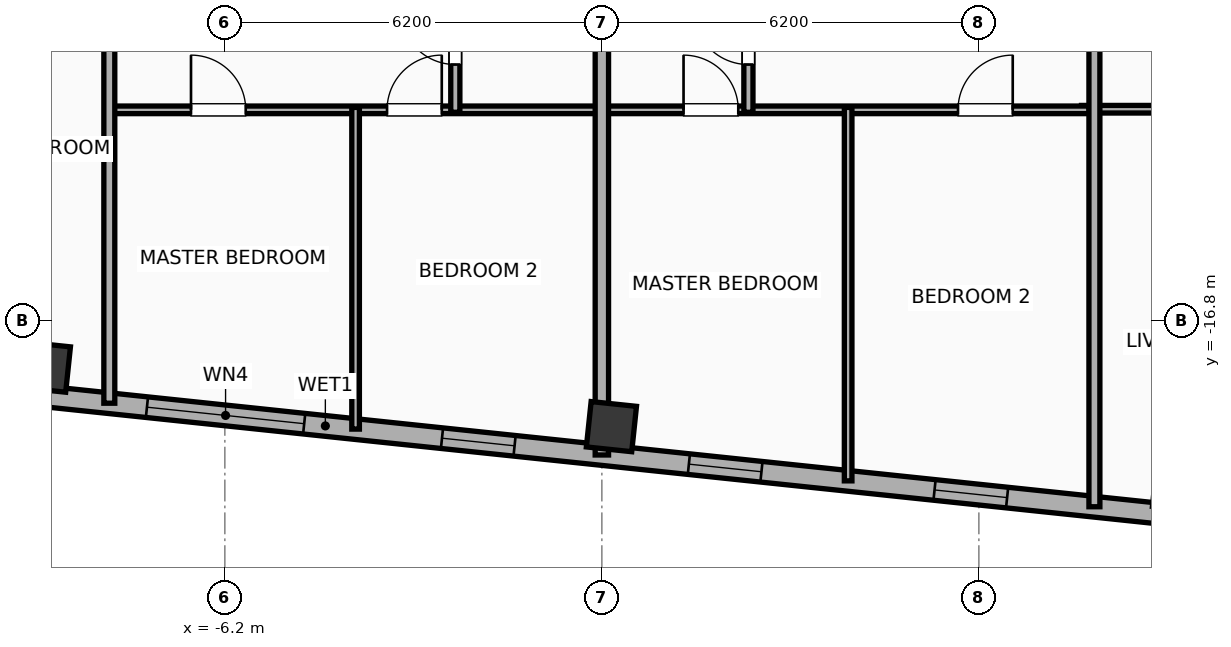
"""IFC4 building model, lengths in metres.
Left out: names, types, materials, properties, quantities, classifications, styles, units other than length and angle.
Written with IfcOpenShell. Run it as: python <this file> out.ifc"""

import sys

from ifc_helpers import new_model, si_unit, direction, frame, frame_2d, origin, origin_2d, place, context, subcontext, project, spatial, rectangle, hollow_rectangle, extrude, element, fill, save


model = new_model("IFC4")
c1 = context("Model", 3, precision=1e-05, world=origin(), true_north=direction((0.0, 1.0)))
c2 = subcontext(c1, "Body", "Model", "MODEL_VIEW")
j1 = project(units=[si_unit("LENGTHUNIT", "METRE"), si_unit("PLANEANGLEUNIT", "RADIAN")], contexts=[c1])
p1 = place(None, origin())
s1 = spatial("IfcSite", under=j1, at=p1, CompositionType="ELEMENT")
p2 = place(p1, origin())
s2 = spatial("IfcBuilding", under=s1, at=p2, CompositionType="ELEMENT")
p3 = place(p2, frame((0.0, 0.0, 299.0)))
s3 = spatial("IfcBuildingStorey", under=s2, at=p3, CompositionType="ELEMENT", Elevation=299.0)
for number, where, z_axis, x_axis in (
    (1, (-9.152, -17.561, 0.0), (0.0, 0.0, 1.0), (0.995, -0.105, 0.0)),
    (2, (0.157, -18.54, 0.0), (0.0, 0.0, 1.0), (0.995, -0.105, 0.0)),
):
    element("IfcColumn", number, at=place(p3, frame(where, z_axis=z_axis, x_axis=x_axis)), inside=s3, PredefinedType="COLUMN", context=c2, shape_type="SweptSolid", body=[
        extrude(hollow_rectangle(XDim=0.75, YDim=0.75, WallThickness=0.025, at=origin_2d()), origin(), (0.0, 0.0, 1.0), 3.9),
    ])
p4 = place(p3, frame((18.708, -20.972, 0.0), z_axis=(0.0, 0.0, 1.0), x_axis=(-0.994521888554, 0.104528528102, 0.0)))
e3 = element("IfcWall", 3, at=p4, inside=s3, PredefinedType="ELEMENTEDWALL", context=c2, shape_type="SweptSolid", body=[
    extrude(rectangle(XDim=46.766, YDim=0.34, at=frame_2d((23.383, 0.0))), origin(), (0.0, 0.0, 1.0), 3.635),
])
p5 = place(p4, frame((23.733, 0.0, 0.65)))
e4 = element("IfcOpeningElement", 4, at=p5, cuts=e3, PredefinedType="OPENING", context=c2, shape_type="SweptSolid", body=[
    extrude(rectangle(XDim=2.6, YDim=2.45, at=frame_2d((1.3, 1.225))), frame((0.0, 0.18, 0.0), z_axis=(0.0, -1.0, 0.0), x_axis=(1.0, 0.0, 0.0)), (0.0, 0.0, 1.0), 0.36),
])
p6 = place(p4, frame((44.402, 0.0, 0.75)))
e5 = element("IfcOpeningElement", 5, at=p6, cuts=e3, PredefinedType="OPENING", context=c2, shape_type="SweptSolid", body=[
    extrude(rectangle(XDim=1.2, YDim=2.05, at=frame_2d((0.6, 1.025))), frame((0.0, 0.18, 0.0), z_axis=(0.0, -1.0, 0.0), x_axis=(1.0, 0.0, 0.0)), (0.0, 0.0, 1.0), 0.36),
])
p7 = place(p4, frame((39.553, 0.0, 0.75)))
e6 = element("IfcOpeningElement", 6, at=p7, cuts=e3, PredefinedType="OPENING", context=c2, shape_type="SweptSolid", body=[
    extrude(rectangle(XDim=1.2, YDim=2.05, at=frame_2d((0.6, 1.025))), frame((0.0, 0.18, 0.0), z_axis=(0.0, -1.0, 0.0), x_axis=(1.0, 0.0, 0.0)), (0.0, 0.0, 1.0), 0.36),
])
p8 = place(p4, frame((42.419, 0.0, 0.75)))
e7 = element("IfcOpeningElement", 7, at=p8, cuts=e3, PredefinedType="OPENING", context=c2, shape_type="SweptSolid", body=[
    extrude(rectangle(XDim=1.2, YDim=2.05, at=frame_2d((0.6, 1.025))), frame((0.0, 0.18, 0.0), z_axis=(0.0, -1.0, 0.0), x_axis=(1.0, 0.0, 0.0)), (0.0, 0.0, 1.0), 0.36),
])
p9 = place(p4, frame((34.933, 0.0, 0.75)))
e8 = element("IfcOpeningElement", 8, at=p9, cuts=e3, PredefinedType="OPENING", context=c2, shape_type="SweptSolid", body=[
    extrude(rectangle(XDim=1.2, YDim=2.05, at=frame_2d((0.6, 1.025))), frame((0.0, 0.18, 0.0), z_axis=(0.0, -1.0, 0.0), x_axis=(1.0, 0.0, 0.0)), (0.0, 0.0, 1.0), 0.36),
])
p10 = place(p4, frame((28.692, 0.0, 0.75)))
e9 = element("IfcOpeningElement", 9, at=p10, cuts=e3, PredefinedType="OPENING", context=c2, shape_type="SweptSolid", body=[
    extrude(rectangle(XDim=1.2, YDim=2.05, at=frame_2d((0.6, 1.025))), frame((0.0, 0.18, 0.0), z_axis=(0.0, -1.0, 0.0), x_axis=(1.0, 0.0, 0.0)), (0.0, 0.0, 1.0), 0.36),
])
p11 = place(p4, frame((30.957, 0.0, 0.75)))
e10 = element("IfcOpeningElement", 10, at=p11, cuts=e3, PredefinedType="OPENING", context=c2, shape_type="SweptSolid", body=[
    extrude(rectangle(XDim=1.2, YDim=2.05, at=frame_2d((0.6, 1.025))), frame((0.0, 0.18, 0.0), z_axis=(0.0, -1.0, 0.0), x_axis=(1.0, 0.0, 0.0)), (0.0, 0.0, 1.0), 0.36),
])
p12 = place(p4, frame((7.492, 0.0, 0.75)))
e11 = element("IfcOpeningElement", 11, at=p12, cuts=e3, PredefinedType="OPENING", context=c2, shape_type="SweptSolid", body=[
    extrude(rectangle(XDim=1.2, YDim=2.05, at=frame_2d((0.6, 1.025))), frame((0.0, 0.18, 0.0), z_axis=(0.0, -1.0, 0.0), x_axis=(1.0, 0.0, 0.0)), (0.0, 0.0, 1.0), 0.36),
])
p13 = place(p4, frame((4.141, 0.0, 0.75)))
e12 = element("IfcOpeningElement", 12, at=p13, cuts=e3, PredefinedType="OPENING", context=c2, shape_type="SweptSolid", body=[
    extrude(rectangle(XDim=1.2, YDim=2.05, at=frame_2d((0.6, 1.025))), frame((0.0, 0.18, 0.0), z_axis=(0.0, -1.0, 0.0), x_axis=(1.0, 0.0, 0.0)), (0.0, 0.0, 1.0), 0.36),
])
p14 = place(p4, frame((1.36, 0.0, 0.75)))
e13 = element("IfcOpeningElement", 13, at=p14, cuts=e3, PredefinedType="OPENING", context=c2, shape_type="SweptSolid", body=[
    extrude(rectangle(XDim=1.2, YDim=2.05, at=frame_2d((0.6, 1.025))), frame((0.0, 0.18, 0.0), z_axis=(0.0, -1.0, 0.0), x_axis=(1.0, 0.0, 0.0)), (0.0, 0.0, 1.0), 0.36),
])
p15 = place(p4, frame((20.254, 0.0, 0.75)))
e14 = element("IfcOpeningElement", 14, at=p15, cuts=e3, PredefinedType="OPENING", context=c2, shape_type="SweptSolid", body=[
    extrude(rectangle(XDim=1.2, YDim=2.05, at=frame_2d((0.6, 1.025))), frame((0.0, 0.18, 0.0), z_axis=(0.0, -1.0, 0.0), x_axis=(1.0, 0.0, 0.0)), (0.0, 0.0, 1.0), 0.36),
])
p16 = place(p4, frame((16.172, 0.0, 0.75)))
e15 = element("IfcOpeningElement", 15, at=p16, cuts=e3, PredefinedType="OPENING", context=c2, shape_type="SweptSolid", body=[
    extrude(rectangle(XDim=1.2, YDim=2.05, at=frame_2d((0.6, 1.025))), frame((0.0, 0.18, 0.0), z_axis=(0.0, -1.0, 0.0), x_axis=(1.0, 0.0, 0.0)), (0.0, 0.0, 1.0), 0.36),
])
p17 = place(p4, frame((12.11, 0.0, 0.75)))
e16 = element("IfcOpeningElement", 16, at=p17, cuts=e3, PredefinedType="OPENING", context=c2, shape_type="SweptSolid", body=[
    extrude(rectangle(XDim=1.2, YDim=2.05, at=frame_2d((0.6, 1.025))), frame((0.0, 0.18, 0.0), z_axis=(0.0, -1.0, 0.0), x_axis=(1.0, 0.0, 0.0)), (0.0, 0.0, 1.0), 0.36),
])
p18 = place(p3, frame((7.887, -13.32, 0.0), z_axis=(0.0, 0.0, 1.0), x_axis=(1.0, 0.0, 0.0)))
e17 = element("IfcWall", 17, at=p18, inside=s3, PredefinedType="PARTITIONING", context=c2, shape_type="SweptSolid", body=[
    extrude(rectangle(XDim=2.623, YDim=0.125, at=frame_2d((1.311, 0.0))), origin(), (0.0, 0.0, 1.0), 3.635),
])
p19 = place(p3, frame((-8.08, -13.33, 0.0), z_axis=(0.0, 0.0, 1.0), x_axis=(1.0, 0.0, 0.0)))
e18 = element("IfcWall", 18, at=p19, inside=s3, PredefinedType="PARTITIONING", context=c2, shape_type="SweptSolid", body=[
    extrude(rectangle(XDim=8.06, YDim=0.125, at=frame_2d((4.03, 0.0))), origin(), (0.0, 0.0, 1.0), 3.635),
])
p20 = place(p19, frame((1.323, 0.0, 0.0)))
e19 = element("IfcOpeningElement", 19, at=p20, cuts=e18, PredefinedType="OPENING", context=c2, shape_type="SweptSolid", body=[
    extrude(rectangle(XDim=0.9, YDim=2.05, at=frame_2d((0.45, 1.025))), frame((0.0, 0.073, 0.0), z_axis=(0.0, -1.0, 0.0), x_axis=(1.0, 0.0, 0.0)), (0.0, 0.0, 1.0), 0.145),
])
p21 = place(p19, frame((4.547, 0.0, 0.0)))
e20 = element("IfcOpeningElement", 20, at=p21, cuts=e18, PredefinedType="OPENING", context=c2, shape_type="SweptSolid", body=[
    extrude(rectangle(XDim=0.9, YDim=2.05, at=frame_2d((0.45, 1.025))), frame((0.0, 0.073, 0.0), z_axis=(0.0, -1.0, 0.0), x_axis=(1.0, 0.0, 0.0)), (0.0, 0.0, 1.0), 0.145),
])
p22 = place(p3, frame((-2.41, -13.37, 0.0), z_axis=(0.0, 0.0, 1.0), x_axis=(0.0, 1.0, 0.0)))
e21 = element("IfcWall", 21, at=p22, inside=s3, PredefinedType="PLUMBINGWALL", context=c2, shape_type="SweptSolid", body=[
    extrude(rectangle(XDim=2.47, YDim=0.15, at=frame_2d((1.235, 0.0))), origin(), (0.0, 0.0, 1.0), 3.635),
])
p23 = place(p22, frame((0.785, 0.0, 0.0)))
e22 = element("IfcOpeningElement", 22, at=p23, cuts=e21, PredefinedType="OPENING", context=c2, shape_type="SweptSolid", body=[
    extrude(rectangle(XDim=0.9, YDim=2.05, at=frame_2d((0.45, 1.025))), frame((0.0, 0.085, 0.0), z_axis=(0.0, -1.0, 0.0), x_axis=(1.0, 0.0, 0.0)), (0.0, 0.0, 1.0), 0.17),
])
p24 = place(p3, frame((-4.05, -18.58, 0.0), z_axis=(0.0, 0.0, 1.0), x_axis=(0.0, 1.0, 0.0)))
e23 = element("IfcWall", 23, at=p24, inside=s3, PredefinedType="PARTITIONING", context=c2, shape_type="SweptSolid", body=[
    extrude(rectangle(XDim=5.29, YDim=0.125, at=frame_2d((2.645, 0.0))), origin(), (0.0, 0.0, 1.0), 3.635),
])
p25 = place(p3, frame((-8.1, -18.155, 0.0), z_axis=(0.0, 0.0, 1.0), x_axis=(0.0, 1.0, 0.0)))
e24 = element("IfcWall", 24, at=p25, inside=s3, PredefinedType="PARTITIONING", context=c2, shape_type="SweptSolid", body=[
    extrude(rectangle(XDim=9.665, YDim=0.18, at=frame_2d((4.832, 0.0))), origin(), (0.0, 0.0, 1.0), 3.635),
])
p26 = place(p25, frame((8.414, 0.0, 0.0)))
e25 = element("IfcOpeningElement", 25, at=p26, cuts=e24, PredefinedType="OPENING", context=c2, shape_type="SweptSolid", body=[
    extrude(rectangle(XDim=0.9, YDim=2.05, at=frame_2d((0.45, 1.025))), frame((0.0, 0.1, 0.0), z_axis=(0.0, -1.0, 0.0), x_axis=(1.0, 0.0, 0.0)), (0.0, 0.0, 1.0), 0.2),
])
p27 = place(p3, frame((0.02, -13.33, 0.0), z_axis=(0.0, 0.0, 1.0), x_axis=(1.0, 0.0, 0.0)))
e26 = element("IfcWall", 26, at=p27, inside=s3, PredefinedType="PARTITIONING", context=c2, shape_type="SweptSolid", body=[
    extrude(rectangle(XDim=7.992, YDim=0.125, at=frame_2d((3.996, 0.0))), origin(), (0.0, 0.0, 1.0), 3.635),
])
p28 = place(p27, frame((1.323, 0.0, 0.0)))
e27 = element("IfcOpeningElement", 27, at=p28, cuts=e26, PredefinedType="OPENING", context=c2, shape_type="SweptSolid", body=[
    extrude(rectangle(XDim=0.9, YDim=2.05, at=frame_2d((0.45, 1.025))), frame((0.0, 0.073, 0.0), z_axis=(0.0, -1.0, 0.0), x_axis=(1.0, 0.0, 0.0)), (0.0, 0.0, 1.0), 0.145),
])
p29 = place(p27, frame((5.837, 0.0, 0.0)))
e28 = element("IfcOpeningElement", 28, at=p29, cuts=e26, PredefinedType="OPENING", context=c2, shape_type="SweptSolid", body=[
    extrude(rectangle(XDim=0.9, YDim=2.05, at=frame_2d((0.45, 1.025))), frame((0.0, 0.073, 0.0), z_axis=(0.0, -1.0, 0.0), x_axis=(1.0, 0.0, 0.0)), (0.0, 0.0, 1.0), 0.145),
])
p30 = place(p3, frame((2.41, -13.37, 0.0), z_axis=(0.0, 0.0, 1.0), x_axis=(0.0, 1.0, 0.0)))
e29 = element("IfcWall", 29, at=p30, inside=s3, PredefinedType="PLUMBINGWALL", context=c2, shape_type="SweptSolid", body=[
    extrude(rectangle(XDim=2.47, YDim=0.15, at=frame_2d((1.235, 0.0))), origin(), (0.0, 0.0, 1.0), 3.075),
])
p31 = place(p30, frame((0.785, 0.0, 0.0)))
e30 = element("IfcOpeningElement", 30, at=p31, cuts=e29, PredefinedType="OPENING", context=c2, shape_type="SweptSolid", body=[
    extrude(rectangle(XDim=0.9, YDim=2.05, at=frame_2d((0.45, 1.025))), frame((0.0, 0.085, 0.0), z_axis=(0.0, -1.0, 0.0), x_axis=(1.0, 0.0, 0.0)), (0.0, 0.0, 1.0), 0.17),
])
p32 = place(p3, frame((4.05, -19.432, 0.0), z_axis=(0.0, 0.0, 1.0), x_axis=(0.0, 1.0, 0.0)))
e31 = element("IfcWall", 31, at=p32, inside=s3, PredefinedType="PARTITIONING", context=c2, shape_type="SweptSolid", body=[
    extrude(rectangle(XDim=6.142, YDim=0.125, at=frame_2d((3.071, 0.0))), origin(), (0.0, 0.0, 1.0), 3.635),
])
p33 = place(p3, frame((8.1, -19.857, 0.0), z_axis=(0.0, 0.0, 1.0), x_axis=(0.0, 1.0, 0.0)))
e32 = element("IfcWall", 32, at=p33, inside=s3, PredefinedType="PARTITIONING", context=c2, shape_type="SweptSolid", body=[
    extrude(rectangle(XDim=11.367, YDim=0.18, at=frame_2d((5.684, 0.0))), origin(), (0.0, 0.0, 1.0), 3.635),
])
p34 = place(p33, frame((10.117, 0.0, 0.0)))
e33 = element("IfcOpeningElement", 33, at=p34, cuts=e32, PredefinedType="OPENING", context=c2, shape_type="SweptSolid", body=[
    extrude(rectangle(XDim=0.9, YDim=2.05, at=frame_2d((0.45, 1.025))), frame((0.0, 0.1, 0.0), z_axis=(0.0, -1.0, 0.0), x_axis=(1.0, 0.0, 0.0)), (0.0, 0.0, 1.0), 0.2),
])
p35 = place(p3, frame((0.0, -19.006, 0.0), z_axis=(0.0, 0.0, 1.0), x_axis=(0.0, 1.0, 0.0)))
e34 = element("IfcWall", 34, at=p35, inside=s3, PredefinedType="PARTITIONING", context=c2, shape_type="SweptSolid", body=[
    extrude(rectangle(XDim=10.516, YDim=0.22, at=frame_2d((5.258, 0.0))), origin(), (0.0, 0.0, 1.0), 3.635),
])
p36 = place(p5, origin())
e35 = element("IfcWindow", 35, at=p36, inside=s3, PartitioningType="SINGLE_PANEL", PredefinedType="WINDOW", context=c2, shape_type="SweptSolid", body=[
    extrude(rectangle(XDim=2.6, YDim=2.45, at=frame_2d((1.3, 1.225))), frame((0.0, 0.03, 0.0), z_axis=(0.0, -1.0, 0.0), x_axis=(1.0, 0.0, 0.0)), (0.0, 0.0, 1.0), 0.06),
])
fill(e4, e35)
p37 = place(p15, origin())
e36 = element("IfcWindow", 36, at=p37, inside=s3, PartitioningType="SINGLE_PANEL", PredefinedType="WINDOW", context=c2, shape_type="SweptSolid", body=[
    extrude(rectangle(XDim=1.2, YDim=2.05, at=frame_2d((0.6, 1.025))), frame((0.0, 0.03, 0.0), z_axis=(0.0, -1.0, 0.0), x_axis=(1.0, 0.0, 0.0)), (0.0, 0.0, 1.0), 0.06),
])
fill(e14, e36)
p38 = place(p16, origin())
e37 = element("IfcWindow", 37, at=p38, inside=s3, PartitioningType="SINGLE_PANEL", PredefinedType="WINDOW", context=c2, shape_type="SweptSolid", body=[
    extrude(rectangle(XDim=1.2, YDim=2.05, at=frame_2d((0.6, 1.025))), frame((0.0, 0.03, 0.0), z_axis=(0.0, -1.0, 0.0), x_axis=(1.0, 0.0, 0.0)), (0.0, 0.0, 1.0), 0.06),
])
fill(e15, e37)
p39 = place(p17, origin())
e38 = element("IfcWindow", 38, at=p39, inside=s3, PartitioningType="SINGLE_PANEL", PredefinedType="WINDOW", context=c2, shape_type="SweptSolid", body=[
    extrude(rectangle(XDim=1.2, YDim=2.05, at=frame_2d((0.6, 1.025))), frame((0.0, 0.03, 0.0), z_axis=(0.0, -1.0, 0.0), x_axis=(1.0, 0.0, 0.0)), (0.0, 0.0, 1.0), 0.06),
])
fill(e16, e38)
p40 = place(p20, origin())
e39 = element("IfcDoor", 39, at=p40, inside=s3, OperationType="SINGLE_SWING_LEFT", PredefinedType="DOOR", context=c2, shape_type="SweptSolid", body=[
    extrude(rectangle(XDim=0.9, YDim=2.05, at=frame_2d((0.45, 1.025))), frame((0.0, 0.025, 0.0), z_axis=(0.0, -1.0, 0.0), x_axis=(1.0, 0.0, 0.0)), (0.0, 0.0, 1.0), 0.05),
])
fill(e19, e39)
p41 = place(p21, origin())
e40 = element("IfcDoor", 40, at=p41, inside=s3, OperationType="SINGLE_SWING_RIGHT", PredefinedType="DOOR", context=c2, shape_type="SweptSolid", body=[
    extrude(rectangle(XDim=0.9, YDim=2.05, at=frame_2d((0.45, 1.025))), frame((0.0, 0.025, 0.0), z_axis=(0.0, -1.0, 0.0), x_axis=(1.0, 0.0, 0.0)), (0.0, 0.0, 1.0), 0.05),
])
fill(e20, e40)
p42 = place(p23, origin())
e41 = element("IfcDoor", 41, at=p42, inside=s3, OperationType="SINGLE_SWING_RIGHT", PredefinedType="DOOR", context=c2, shape_type="SweptSolid", body=[
    extrude(rectangle(XDim=0.9, YDim=2.05, at=frame_2d((0.45, 1.025))), frame((0.0, 0.025, 0.0), z_axis=(0.0, -1.0, 0.0), x_axis=(1.0, 0.0, 0.0)), (0.0, 0.0, 1.0), 0.05),
])
fill(e22, e41)
p43 = place(p28, origin())
e42 = element("IfcDoor", 42, at=p43, inside=s3, OperationType="SINGLE_SWING_LEFT", PredefinedType="DOOR", context=c2, shape_type="SweptSolid", body=[
    extrude(rectangle(XDim=0.9, YDim=2.05, at=frame_2d((0.45, 1.025))), frame((0.0, 0.025, 0.0), z_axis=(0.0, -1.0, 0.0), x_axis=(1.0, 0.0, 0.0)), (0.0, 0.0, 1.0), 0.05),
])
fill(e27, e42)
p44 = place(p29, origin())
e43 = element("IfcDoor", 43, at=p44, inside=s3, OperationType="SINGLE_SWING_RIGHT", PredefinedType="DOOR", context=c2, shape_type="SweptSolid", body=[
    extrude(rectangle(XDim=0.9, YDim=2.05, at=frame_2d((0.45, 1.025))), frame((0.0, 0.025, 0.0), z_axis=(0.0, -1.0, 0.0), x_axis=(1.0, 0.0, 0.0)), (0.0, 0.0, 1.0), 0.05),
])
fill(e28, e43)
p45 = place(p31, origin())
e44 = element("IfcDoor", 44, at=p45, inside=s3, OperationType="SINGLE_SWING_RIGHT", PredefinedType="DOOR", context=c2, shape_type="SweptSolid", body=[
    extrude(rectangle(XDim=0.9, YDim=2.05, at=frame_2d((0.45, 1.025))), frame((0.0, 0.025, 0.0), z_axis=(0.0, -1.0, 0.0), x_axis=(1.0, 0.0, 0.0)), (0.0, 0.0, 1.0), 0.05),
])
fill(e30, e44)
save(model, sys.argv[1])
